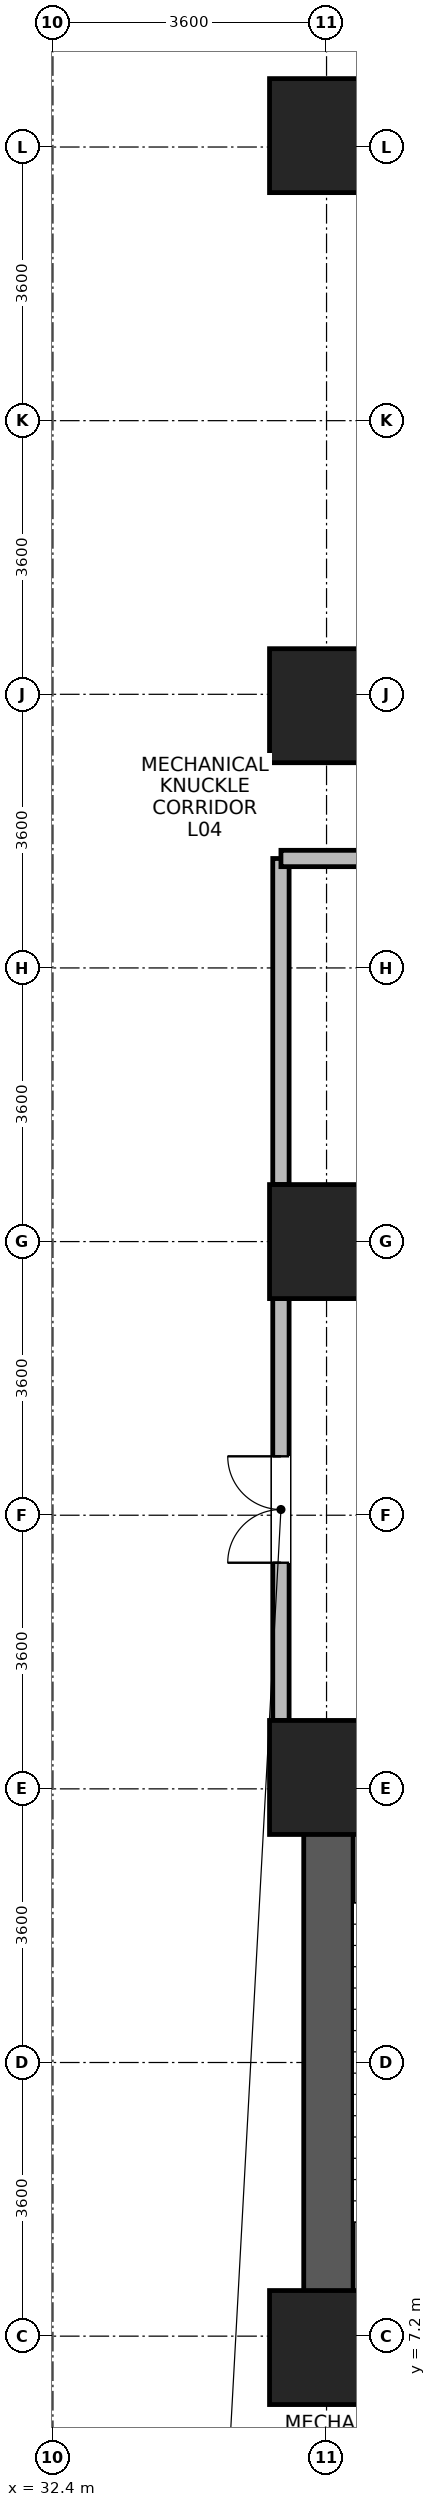
"""IFC4 building model, lengths in metres.
Left out: names, types, materials, properties, quantities, classifications, styles, units other than length and angle.
Written with IfcOpenShell. Run it as: python <this file> out.ifc"""

import sys

from ifc_helpers import new_model, si_unit, direction, frame, frame_2d, origin, origin_2d, place, context, subcontext, project, spatial, rectangle, extrude, source, transform, mapped, element, fill, save


model = new_model("IFC4")
c1 = context("Model", 3, precision=1e-05, world=origin(), true_north=direction((0.0, 1.0)))
c2 = subcontext(c1, "Body", "Model", "MODEL_VIEW")
j1 = project(units=[si_unit("LENGTHUNIT", "METRE"), si_unit("PLANEANGLEUNIT", "RADIAN")], contexts=[c1])
p1 = place(None, origin())
s1 = spatial("IfcSite", under=j1, at=p1, CompositionType="ELEMENT")
p2 = place(p1, origin())
s2 = spatial("IfcBuilding", under=s1, at=p2, CompositionType="ELEMENT")
p3 = place(p2, frame((0.0, 0.0, 19.8)))
s3 = spatial("IfcBuildingStorey", under=s2, at=p3, CompositionType="ELEMENT", Elevation=19.8)
p4 = place(p3, frame((36.025, 6.65, 0.0), z_axis=(0.0, 0.0, 1.0), x_axis=(0.0, 1.0, 0.0)))
e1 = element("IfcWall", 1, at=p4, inside=s3, PredefinedType="SHEAR", context=c2, shape_type="SweptSolid", body=[
    extrude(rectangle(XDim=8.3, YDim=0.65, at=frame_2d((4.15, 0.0))), origin(), (0.0, 0.0, 1.0), 5.08),
])
for number, where, z_axis, x_axis in (
    (2, (36.35, 6.975, 0.0), (0.0, 0.0, 1.0), (1.0, 0.0, 0.0)),
    (3, (36.35, 14.625, 0.0), (0.0, 0.0, 1.0), (1.0, 0.0, 0.0)),
):
    element("IfcWall", number, at=place(p3, frame(where, z_axis=z_axis, x_axis=x_axis)), inside=s3, PredefinedType="SHEAR", context=c2, shape_type="SweptSolid", body=[
        extrude(rectangle(XDim=3.2, YDim=0.65, at=frame_2d((1.6, 0.0))), origin(), (0.0, 0.0, 1.0), 5.08),
    ])
m1 = source(origin(), c2, "Body", "SweptSolid", [
    extrude(rectangle(XDim=1.5, YDim=1.5, at=origin_2d()), origin(), (0.0, 0.0, 1.0), 5.5),
])
for number, where, z_axis, x_axis in (
    (4, (36.0, 21.6, 0.0), (0.0, 0.0, 1.0), (1.0, 0.0, 0.0)),
    (5, (36.0, 28.65, 0.0), (0.0, 0.0, 1.0), (1.0, 0.0, 0.0)),
    (6, (36.0, 36.15, 0.0), (0.0, 0.0, 1.0), (1.0, 0.0, 0.0)),
    (7, (36.0, 7.05, 0.0), (0.0, 0.0, 1.0), (1.0, 0.0, 0.0)),
    (8, (36.0, 14.55, 0.0), (0.0, 0.0, 1.0), (1.0, 0.0, 0.0)),
):
    element("IfcColumn", number, at=place(p3, frame(where, z_axis=z_axis, x_axis=x_axis)), inside=s3, PredefinedType="COLUMN", context=c2, shape_type="MappedRepresentation", body=[
        mapped(m1, transform((0.0, 0.0, 0.0), x_axis=(1.0, 0.0, 0.0), y_axis=(0.0, 1.0, 0.0), z_axis=(0.0, 0.0, 1.0), scale=1.0)),
    ])
p5 = place(p3, frame((35.4, 15.3, 0.0), z_axis=(0.0, 0.0, 1.0), x_axis=(0.0, 1.0, 0.0)))
e9 = element("IfcWall", 9, at=p5, inside=s3, PredefinedType="PARTITIONING", context=c2, shape_type="SweptSolid", body=[
    extrude(rectangle(XDim=5.55, YDim=0.215, at=frame_2d((2.775, 0.0))), origin(), (0.0, 0.0, 1.0), 5.06),
])
p6 = place(p5, frame((2.075, 0.0, 0.0)))
e10 = element("IfcOpeningElement", 10, at=p6, cuts=e9, PredefinedType="OPENING", context=c2, shape_type="SweptSolid", body=[
    extrude(rectangle(XDim=1.4, YDim=2.15, at=frame_2d((0.7, 1.075))), frame((0.0, 0.118, 0.0), z_axis=(0.0, -1.0, 0.0), x_axis=(1.0, 0.0, 0.0)), (0.0, 0.0, 1.0), 0.235),
])
p7 = place(p3, frame((35.4, 22.35, 0.0), z_axis=(0.0, 0.0, 1.0), x_axis=(0.0, 1.0, 0.0)))
e11 = element("IfcWall", 11, at=p7, inside=s3, PredefinedType="PARTITIONING", context=c2, shape_type="SweptSolid", body=[
    extrude(rectangle(XDim=4.29, YDim=0.215, at=frame_2d((2.145, 0.0))), origin(), (0.0, 0.0, 1.0), 5.06),
])
p8 = place(p3, frame((35.4, 26.64, 0.0), z_axis=(0.0, 0.0, 1.0), x_axis=(1.0, 0.0, 0.0)))
e12 = element("IfcWall", 12, at=p8, inside=s3, PredefinedType="PARTITIONING", context=c2, shape_type="SweptSolid", body=[
    extrude(rectangle(XDim=22.068, YDim=0.215, at=frame_2d((11.034, 0.0))), origin(), (0.0, 0.0, 1.0), 5.06),
])
p9 = place(p6, origin())
e13 = element("IfcDoor", 13, at=p9, inside=s3, OperationType="DOUBLE_DOOR_SINGLE_SWING", PredefinedType="DOOR", context=c2, shape_type="SweptSolid", body=[
    extrude(rectangle(XDim=1.4, YDim=2.15, at=frame_2d((0.7, 1.075))), frame((0.0, 0.025, 0.0), z_axis=(0.0, -1.0, 0.0), x_axis=(1.0, 0.0, 0.0)), (0.0, 0.0, 1.0), 0.05),
])
fill(e10, e13)
save(model, sys.argv[1])
